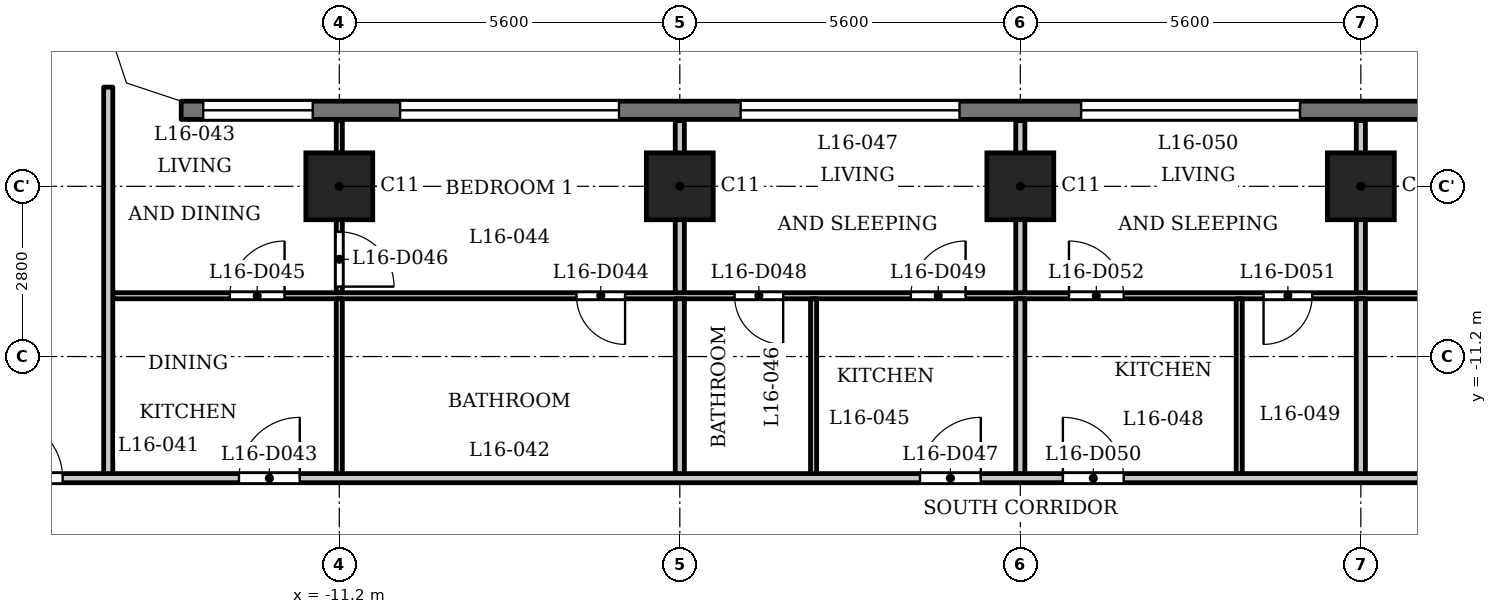
"""IFC4 building model, lengths in metres.
Left out: names, types, materials, properties, quantities, classifications, styles, units other than length and angle.
Written with IfcOpenShell. Run it as: python <this file> out.ifc"""

import sys

from ifc_helpers import new_model, si_unit, direction, frame, frame_2d, origin, origin_2d, place, context, subcontext, project, spatial, polyline, rectangle, outline, extrude, element, fill, save


model = new_model("IFC4")
c1 = context("Model", 3, precision=1e-05, world=origin(), true_north=direction((0.0, 1.0)))
c2 = subcontext(c1, "Body", "Model", "MODEL_VIEW")
j1 = project(units=[si_unit("LENGTHUNIT", "METRE"), si_unit("PLANEANGLEUNIT", "RADIAN")], contexts=[c1])
p1 = place(None, origin())
s1 = spatial("IfcSite", under=j1, at=p1, CompositionType="ELEMENT")
p2 = place(p1, origin())
s2 = spatial("IfcBuilding", under=s1, at=p2, CompositionType="ELEMENT")
p3 = place(p2, frame((0.0, 0.0, 65.5)))
s3 = spatial("IfcBuildingStorey", under=s2, at=p3, CompositionType="ELEMENT", Elevation=65.5)
for number, where, z_axis, x_axis in (
    (1, (-11.2, -8.4, 0.0), (0.0, 0.0, 1.0), (1.0, 0.0, 0.0)),
    (2, (-5.6, -8.4, 0.0), (0.0, 0.0, 1.0), (1.0, 0.0, 0.0)),
    (3, (0.0, -8.4, 0.0), (0.0, 0.0, 1.0), (1.0, 0.0, 0.0)),
    (4, (5.6, -8.4, 0.0), (0.0, 0.0, 1.0), (1.0, 0.0, 0.0)),
):
    element("IfcColumn", number, at=place(p3, frame(where, z_axis=z_axis, x_axis=x_axis)), inside=s3, PredefinedType="COLUMN", context=c2, shape_type="SweptSolid", body=[
        extrude(rectangle(XDim=1.1, YDim=1.1, at=origin_2d()), origin(), (0.0, 0.0, 1.0), 3.5),
    ])
p4 = place(p3, frame((13.8, -7.15, 0.0), z_axis=(0.0, 0.0, 1.0), x_axis=(-1.0, 0.0, 0.0)))
e5 = element("IfcWall", 5, at=p4, inside=s3, PredefinedType="SOLIDWALL", context=c2, shape_type="SweptSolid", body=[
    extrude(rectangle(XDim=27.6, YDim=0.3, at=frame_2d((13.8, 0.0))), origin(), (0.0, 0.0, 1.0), 3.2),
])
p5 = place(p4, frame((0.363, 0.0, 0.9)))
e6 = element("IfcOpeningElement", 6, at=p5, cuts=e5, PredefinedType="OPENING", context=c2, shape_type="SweptSolid", body=[
    extrude(rectangle(XDim=1.8, YDim=1.25, at=frame_2d((0.9, 0.625))), frame((0.0, 0.16, 0.0), z_axis=(0.0, -1.0, 0.0), x_axis=(1.0, 0.0, 0.0)), (0.0, 0.0, 1.0), 0.32),
])
p6 = place(p4, frame((3.6, 0.0, 1.2)))
e7 = element("IfcOpeningElement", 7, at=p6, cuts=e5, PredefinedType="OPENING", context=c2, shape_type="SweptSolid", body=[
    extrude(rectangle(XDim=3.6, YDim=0.95, at=frame_2d((1.8, 0.475))), frame((0.0, 0.16, 0.0), z_axis=(0.0, -1.0, 0.0), x_axis=(1.0, 0.0, 0.0)), (0.0, 0.0, 1.0), 0.32),
])
p7 = place(p4, frame((9.2, 0.0, 1.2)))
e8 = element("IfcOpeningElement", 8, at=p7, cuts=e5, PredefinedType="OPENING", context=c2, shape_type="SweptSolid", body=[
    extrude(rectangle(XDim=3.6, YDim=0.95, at=frame_2d((1.8, 0.475))), frame((0.0, 0.16, 0.0), z_axis=(0.0, -1.0, 0.0), x_axis=(1.0, 0.0, 0.0)), (0.0, 0.0, 1.0), 0.32),
])
p8 = place(p4, frame((14.8, 0.0, 1.2)))
e9 = element("IfcOpeningElement", 9, at=p8, cuts=e5, PredefinedType="OPENING", context=c2, shape_type="SweptSolid", body=[
    extrude(rectangle(XDim=3.6, YDim=0.95, at=frame_2d((1.8, 0.475))), frame((0.0, 0.16, 0.0), z_axis=(0.0, -1.0, 0.0), x_axis=(1.0, 0.0, 0.0)), (0.0, 0.0, 1.0), 0.32),
])
p9 = place(p4, frame((20.4, 0.0, 1.2)))
e10 = element("IfcOpeningElement", 10, at=p9, cuts=e5, PredefinedType="OPENING", context=c2, shape_type="SweptSolid", body=[
    extrude(rectangle(XDim=3.6, YDim=0.95, at=frame_2d((1.8, 0.475))), frame((0.0, 0.16, 0.0), z_axis=(0.0, -1.0, 0.0), x_axis=(1.0, 0.0, 0.0)), (0.0, 0.0, 1.0), 0.32),
])
p10 = place(p4, frame((25.438, 0.0, 0.9)))
e11 = element("IfcOpeningElement", 11, at=p10, cuts=e5, PredefinedType="OPENING", context=c2, shape_type="SweptSolid", body=[
    extrude(rectangle(XDim=1.8, YDim=1.25, at=frame_2d((0.9, 0.625))), frame((0.0, 0.16, 0.0), z_axis=(0.0, -1.0, 0.0), x_axis=(1.0, 0.0, 0.0)), (0.0, 0.0, 1.0), 0.32),
])
p11 = place(p3, frame((-17.4, -13.2, 0.0), z_axis=(0.0, 0.0, 1.0), x_axis=(1.0, 0.0, 0.0)))
e12 = element("IfcWall", 12, at=p11, inside=s3, PredefinedType="PARTITIONING", context=c2, shape_type="SweptSolid", body=[
    extrude(rectangle(XDim=34.8, YDim=0.15, at=frame_2d((17.4, 0.0))), origin(), (0.0, 0.0, 1.0), 3.2),
])
p12 = place(p11, frame((0.65, 0.0, 0.0)))
e13 = element("IfcOpeningElement", 13, at=p12, cuts=e12, PredefinedType="OPENING", context=c2, shape_type="SweptSolid", body=[
    extrude(rectangle(XDim=1.0, YDim=2.1, at=frame_2d((0.5, 1.05))), frame((0.0, 0.085, 0.0), z_axis=(0.0, -1.0, 0.0), x_axis=(1.0, 0.0, 0.0)), (0.0, 0.0, 1.0), 0.17),
])
p13 = place(p11, frame((33.05, 0.0, 0.0)))
e14 = element("IfcOpeningElement", 14, at=p13, cuts=e12, PredefinedType="OPENING", context=c2, shape_type="SweptSolid", body=[
    extrude(rectangle(XDim=1.0, YDim=2.1, at=frame_2d((0.5, 1.05))), frame((0.0, 0.085, 0.0), z_axis=(0.0, -1.0, 0.0), x_axis=(1.0, 0.0, 0.0)), (0.0, 0.0, 1.0), 0.17),
])
p14 = place(p11, frame((4.55, 0.0, 0.0)))
e15 = element("IfcOpeningElement", 15, at=p14, cuts=e12, PredefinedType="OPENING", context=c2, shape_type="SweptSolid", body=[
    extrude(rectangle(XDim=1.0, YDim=2.1, at=frame_2d((0.5, 1.05))), frame((0.0, 0.085, 0.0), z_axis=(0.0, -1.0, 0.0), x_axis=(1.0, 0.0, 0.0)), (0.0, 0.0, 1.0), 0.17),
])
p15 = place(p11, frame((15.75, 0.0, 0.0)))
e16 = element("IfcOpeningElement", 16, at=p15, cuts=e12, PredefinedType="OPENING", context=c2, shape_type="SweptSolid", body=[
    extrude(rectangle(XDim=1.0, YDim=2.1, at=frame_2d((0.5, 1.05))), frame((0.0, 0.085, 0.0), z_axis=(0.0, -1.0, 0.0), x_axis=(1.0, 0.0, 0.0)), (0.0, 0.0, 1.0), 0.17),
])
p16 = place(p11, frame((18.1, 0.0, 0.0)))
e17 = element("IfcOpeningElement", 17, at=p16, cuts=e12, PredefinedType="OPENING", context=c2, shape_type="SweptSolid", body=[
    extrude(rectangle(XDim=1.0, YDim=2.1, at=frame_2d((0.5, 1.05))), frame((0.0, 0.085, 0.0), z_axis=(0.0, -1.0, 0.0), x_axis=(1.0, 0.0, 0.0)), (0.0, 0.0, 1.0), 0.17),
])
p17 = place(p11, frame((26.95, 0.0, 0.0)))
e18 = element("IfcOpeningElement", 18, at=p17, cuts=e12, PredefinedType="OPENING", context=c2, shape_type="SweptSolid", body=[
    extrude(rectangle(XDim=1.0, YDim=2.1, at=frame_2d((0.5, 1.05))), frame((0.0, 0.085, 0.0), z_axis=(0.0, -1.0, 0.0), x_axis=(1.0, 0.0, 0.0)), (0.0, 0.0, 1.0), 0.17),
])
p18 = place(p3, frame((-14.925, -10.2, 0.0), z_axis=(0.0, 0.0, 1.0), x_axis=(1.0, 0.0, 0.0)))
e19 = element("IfcWall", 19, at=p18, inside=s3, PredefinedType="PARTITIONING", context=c2, shape_type="SweptSolid", body=[
    extrude(rectangle(XDim=29.85, YDim=0.1, at=frame_2d((14.925, 0.0))), origin(), (0.0, 0.0, 1.0), 3.2),
])
p19 = place(p18, frame((7.625, 0.0, 0.0)))
e20 = element("IfcOpeningElement", 20, at=p19, cuts=e19, PredefinedType="OPENING", context=c2, shape_type="SweptSolid", body=[
    extrude(rectangle(XDim=0.8, YDim=2.1, at=frame_2d((0.4, 1.05))), frame((0.0, 0.06, 0.0), z_axis=(0.0, -1.0, 0.0), x_axis=(1.0, 0.0, 0.0)), (0.0, 0.0, 1.0), 0.12),
])
p20 = place(p18, frame((1.925, 0.0, 0.0)))
e21 = element("IfcOpeningElement", 21, at=p20, cuts=e19, PredefinedType="OPENING", context=c2, shape_type="SweptSolid", body=[
    extrude(rectangle(XDim=0.9, YDim=2.1, at=frame_2d((0.45, 1.05))), frame((0.0, 0.06, 0.0), z_axis=(0.0, -1.0, 0.0), x_axis=(1.0, 0.0, 0.0)), (0.0, 0.0, 1.0), 0.12),
])
p21 = place(p18, frame((10.225, 0.0, 0.0)))
e22 = element("IfcOpeningElement", 22, at=p21, cuts=e19, PredefinedType="OPENING", context=c2, shape_type="SweptSolid", body=[
    extrude(rectangle(XDim=0.8, YDim=2.1, at=frame_2d((0.4, 1.05))), frame((0.0, 0.06, 0.0), z_axis=(0.0, -1.0, 0.0), x_axis=(1.0, 0.0, 0.0)), (0.0, 0.0, 1.0), 0.12),
])
p22 = place(p18, frame((13.125, 0.0, 0.0)))
e23 = element("IfcOpeningElement", 23, at=p22, cuts=e19, PredefinedType="OPENING", context=c2, shape_type="SweptSolid", body=[
    extrude(rectangle(XDim=0.9, YDim=2.1, at=frame_2d((0.45, 1.05))), frame((0.0, 0.06, 0.0), z_axis=(0.0, -1.0, 0.0), x_axis=(1.0, 0.0, 0.0)), (0.0, 0.0, 1.0), 0.12),
])
p23 = place(p18, frame((18.925, 0.0, 0.0)))
e24 = element("IfcOpeningElement", 24, at=p23, cuts=e19, PredefinedType="OPENING", context=c2, shape_type="SweptSolid", body=[
    extrude(rectangle(XDim=0.8, YDim=2.1, at=frame_2d((0.4, 1.05))), frame((0.0, 0.06, 0.0), z_axis=(0.0, -1.0, 0.0), x_axis=(1.0, 0.0, 0.0)), (0.0, 0.0, 1.0), 0.12),
])
p24 = place(p18, frame((15.725, 0.0, 0.0)))
e25 = element("IfcOpeningElement", 25, at=p24, cuts=e19, PredefinedType="OPENING", context=c2, shape_type="SweptSolid", body=[
    extrude(rectangle(XDim=0.9, YDim=2.1, at=frame_2d((0.45, 1.05))), frame((0.0, 0.06, 0.0), z_axis=(0.0, -1.0, 0.0), x_axis=(1.0, 0.0, 0.0)), (0.0, 0.0, 1.0), 0.12),
])
p25 = place(p18, frame((28.525, 0.0, 0.0)))
e26 = element("IfcOpeningElement", 26, at=p25, cuts=e19, PredefinedType="OPENING", context=c2, shape_type="SweptSolid", body=[
    extrude(rectangle(XDim=0.8, YDim=2.1, at=frame_2d((0.4, 1.05))), frame((0.0, 0.06, 0.0), z_axis=(0.0, -1.0, 0.0), x_axis=(1.0, 0.0, 0.0)), (0.0, 0.0, 1.0), 0.12),
])
p26 = place(p18, frame((24.325, 0.0, 0.0)))
e27 = element("IfcOpeningElement", 27, at=p26, cuts=e19, PredefinedType="OPENING", context=c2, shape_type="SweptSolid", body=[
    extrude(rectangle(XDim=0.9, YDim=2.1, at=frame_2d((0.45, 1.05))), frame((0.0, 0.06, 0.0), z_axis=(0.0, -1.0, 0.0), x_axis=(1.0, 0.0, 0.0)), (0.0, 0.0, 1.0), 0.12),
])
p27 = place(p3, frame((-15.0, -13.125, 0.0), z_axis=(0.0, 0.0, 1.0), x_axis=(0.0, 1.0, 0.0)))
e28 = element("IfcWall", 28, at=p27, inside=s3, PredefinedType="PARTITIONING", context=c2, shape_type="SweptSolid", body=[
    extrude(rectangle(XDim=6.356, YDim=0.15, at=frame_2d((3.178, 0.0))), origin(), (0.0, 0.0, 1.0), 3.2),
])
p28 = place(p3, frame((-11.2, -13.125, 0.0), z_axis=(0.0, 0.0, 1.0), x_axis=(0.0, 1.0, 0.0)))
e29 = element("IfcWall", 29, at=p28, inside=s3, PredefinedType="PARTITIONING", context=c2, shape_type="SweptSolid", body=[
    extrude(rectangle(XDim=2.875, YDim=0.1, at=frame_2d((1.438, 0.0))), origin(), (0.0, 0.0, 1.0), 3.2),
])
p29 = place(p3, frame((-11.2, -10.15, 0.0), z_axis=(0.0, 0.0, 1.0), x_axis=(0.0, 1.0, 0.0)))
e30 = element("IfcWall", 30, at=p29, inside=s3, PredefinedType="PARTITIONING", context=c2, shape_type="SweptSolid", body=[
    extrude(rectangle(XDim=2.83, YDim=0.1, at=frame_2d((1.415, 0.0))), origin(), (0.0, 0.0, 1.0), 3.2),
])
p30 = place(p29, frame((0.1, 0.0, 0.0)))
e31 = element("IfcOpeningElement", 31, at=p30, cuts=e30, PredefinedType="OPENING", context=c2, shape_type="SweptSolid", body=[
    extrude(rectangle(XDim=0.9, YDim=2.1, at=frame_2d((0.45, 1.05))), frame((0.0, 0.06, 0.0), z_axis=(0.0, -1.0, 0.0), x_axis=(1.0, 0.0, 0.0)), (0.0, 0.0, 1.0), 0.12),
])
p31 = place(p3, frame((-5.6, -13.125, 0.0), z_axis=(0.0, 0.0, 1.0), x_axis=(0.0, 1.0, 0.0)))
e32 = element("IfcWall", 32, at=p31, inside=s3, PredefinedType="PARTITIONING", context=c2, shape_type="SweptSolid", body=[
    extrude(rectangle(XDim=2.875, YDim=0.15, at=frame_2d((1.438, 0.0))), origin(), (0.0, 0.0, 1.0), 3.2),
])
p32 = place(p3, frame((-5.6, -10.15, 0.0), z_axis=(0.0, 0.0, 1.0), x_axis=(0.0, 1.0, 0.0)))
e33 = element("IfcWall", 33, at=p32, inside=s3, PredefinedType="PARTITIONING", context=c2, shape_type="SweptSolid", body=[
    extrude(rectangle(XDim=2.83, YDim=0.15, at=frame_2d((1.415, 0.0))), origin(), (0.0, 0.0, 1.0), 3.2),
])
p33 = place(p3, frame((-3.4, -13.125, 0.0), z_axis=(0.0, 0.0, 1.0), x_axis=(0.0, 1.0, 0.0)))
e34 = element("IfcWall", 34, at=p33, inside=s3, PredefinedType="PARTITIONING", context=c2, shape_type="SweptSolid", body=[
    extrude(rectangle(XDim=2.875, YDim=0.1, at=frame_2d((1.438, 0.0))), origin(), (0.0, 0.0, 1.0), 3.2),
])
p34 = place(p3, frame((0.0, -13.125, 0.0), z_axis=(0.0, 0.0, 1.0), x_axis=(0.0, 1.0, 0.0)))
e35 = element("IfcWall", 35, at=p34, inside=s3, PredefinedType="PARTITIONING", context=c2, shape_type="SweptSolid", body=[
    extrude(rectangle(XDim=2.875, YDim=0.15, at=frame_2d((1.438, 0.0))), origin(), (0.0, 0.0, 1.0), 3.2),
])
p35 = place(p3, frame((0.0, -10.15, 0.0), z_axis=(0.0, 0.0, 1.0), x_axis=(0.0, 1.0, 0.0)))
e36 = element("IfcWall", 36, at=p35, inside=s3, PredefinedType="PARTITIONING", context=c2, shape_type="SweptSolid", body=[
    extrude(rectangle(XDim=2.83, YDim=0.15, at=frame_2d((1.415, 0.0))), origin(), (0.0, 0.0, 1.0), 3.2),
])
p36 = place(p3, frame((3.6, -13.125, 0.0), z_axis=(0.0, 0.0, 1.0), x_axis=(0.0, 1.0, 0.0)))
e37 = element("IfcWall", 37, at=p36, inside=s3, PredefinedType="PARTITIONING", context=c2, shape_type="SweptSolid", body=[
    extrude(rectangle(XDim=2.875, YDim=0.1, at=frame_2d((1.438, 0.0))), origin(), (0.0, 0.0, 1.0), 3.2),
])
p37 = place(p3, frame((5.6, -13.125, 0.0), z_axis=(0.0, 0.0, 1.0), x_axis=(0.0, 1.0, 0.0)))
e38 = element("IfcWall", 38, at=p37, inside=s3, PredefinedType="PARTITIONING", context=c2, shape_type="SweptSolid", body=[
    extrude(rectangle(XDim=2.875, YDim=0.15, at=frame_2d((1.438, 0.0))), origin(), (0.0, 0.0, 1.0), 3.2),
])
p38 = place(p3, frame((5.6, -10.15, 0.0), z_axis=(0.0, 0.0, 1.0), x_axis=(0.0, 1.0, 0.0)))
e39 = element("IfcWall", 39, at=p38, inside=s3, PredefinedType="PARTITIONING", context=c2, shape_type="SweptSolid", body=[
    extrude(rectangle(XDim=2.83, YDim=0.15, at=frame_2d((1.415, 0.0))), origin(), (0.0, 0.0, 1.0), 3.2),
])
p39 = place(p3, origin())
e40 = element("IfcWall", 40, at=p39, inside=s3, PredefinedType="SOLIDWALL", context=c2, shape_type="SweptSolid", body=[
    extrude(outline(polyline([(-14.937, -6.937), (-13.849, -7.3), (-13.8, -7.3), (-13.8, -7.0), (-14.7, -6.7), (-15.0, -5.8), (-15.3, -5.8), (-15.3, -5.849), (-14.937, -6.937)])), origin(), (0.0, 0.0, 1.0), 3.2),
])
p40 = place(p12, origin())
e41 = element("IfcDoor", 41, at=p40, inside=s3, OperationType="SINGLE_SWING_RIGHT", PredefinedType="DOOR", context=c2, shape_type="SweptSolid", body=[
    extrude(rectangle(XDim=1.0, YDim=2.1, at=frame_2d((0.5, 1.05))), frame((0.0, 0.025, 0.0), z_axis=(0.0, -1.0, 0.0), x_axis=(1.0, 0.0, 0.0)), (0.0, 0.0, 1.0), 0.05),
])
fill(e13, e41)
p41 = place(p14, origin())
e42 = element("IfcDoor", 42, at=p41, inside=s3, OperationType="SINGLE_SWING_LEFT", PredefinedType="DOOR", context=c2, shape_type="SweptSolid", body=[
    extrude(rectangle(XDim=1.0, YDim=2.1, at=frame_2d((0.5, 1.05))), frame((0.0, 0.025, 0.0), z_axis=(0.0, -1.0, 0.0), x_axis=(1.0, 0.0, 0.0)), (0.0, 0.0, 1.0), 0.05),
])
fill(e15, e42)
p42 = place(p19, origin())
e43 = element("IfcDoor", 43, at=p42, inside=s3, OperationType="SINGLE_SWING_RIGHT", PredefinedType="DOOR", context=c2, shape_type="SweptSolid", body=[
    extrude(rectangle(XDim=0.8, YDim=2.1, at=frame_2d((0.4, 1.05))), frame((0.0, 0.025, 0.0), z_axis=(0.0, -1.0, 0.0), x_axis=(1.0, 0.0, 0.0)), (0.0, 0.0, 1.0), 0.05),
])
fill(e20, e43)
p43 = place(p20, origin())
e44 = element("IfcDoor", 44, at=p43, inside=s3, OperationType="SINGLE_SWING_LEFT", PredefinedType="DOOR", context=c2, shape_type="SweptSolid", body=[
    extrude(rectangle(XDim=0.9, YDim=2.1, at=frame_2d((0.45, 1.05))), frame((0.0, 0.025, 0.0), z_axis=(0.0, -1.0, 0.0), x_axis=(1.0, 0.0, 0.0)), (0.0, 0.0, 1.0), 0.05),
])
fill(e21, e44)
p44 = place(p30, origin())
e45 = element("IfcDoor", 45, at=p44, inside=s3, OperationType="SINGLE_SWING_LEFT", PredefinedType="DOOR", context=c2, shape_type="SweptSolid", body=[
    extrude(rectangle(XDim=0.9, YDim=2.1, at=frame_2d((0.45, 1.05))), frame((0.0, 0.025, 0.0), z_axis=(0.0, -1.0, 0.0), x_axis=(1.0, 0.0, 0.0)), (0.0, 0.0, 1.0), 0.05),
])
fill(e31, e45)
p45 = place(p15, origin())
e46 = element("IfcDoor", 46, at=p45, inside=s3, OperationType="SINGLE_SWING_LEFT", PredefinedType="DOOR", context=c2, shape_type="SweptSolid", body=[
    extrude(rectangle(XDim=1.0, YDim=2.1, at=frame_2d((0.5, 1.05))), frame((0.0, 0.025, 0.0), z_axis=(0.0, -1.0, 0.0), x_axis=(1.0, 0.0, 0.0)), (0.0, 0.0, 1.0), 0.05),
])
fill(e16, e46)
p46 = place(p21, origin())
e47 = element("IfcDoor", 47, at=p46, inside=s3, OperationType="SINGLE_SWING_RIGHT", PredefinedType="DOOR", context=c2, shape_type="SweptSolid", body=[
    extrude(rectangle(XDim=0.8, YDim=2.1, at=frame_2d((0.4, 1.05))), frame((0.0, 0.025, 0.0), z_axis=(0.0, -1.0, 0.0), x_axis=(1.0, 0.0, 0.0)), (0.0, 0.0, 1.0), 0.05),
])
fill(e22, e47)
p47 = place(p22, origin())
e48 = element("IfcDoor", 48, at=p47, inside=s3, OperationType="SINGLE_SWING_LEFT", PredefinedType="DOOR", context=c2, shape_type="SweptSolid", body=[
    extrude(rectangle(XDim=0.9, YDim=2.1, at=frame_2d((0.45, 1.05))), frame((0.0, 0.025, 0.0), z_axis=(0.0, -1.0, 0.0), x_axis=(1.0, 0.0, 0.0)), (0.0, 0.0, 1.0), 0.05),
])
fill(e23, e48)
p48 = place(p16, origin())
e49 = element("IfcDoor", 49, at=p48, inside=s3, OperationType="SINGLE_SWING_RIGHT", PredefinedType="DOOR", context=c2, shape_type="SweptSolid", body=[
    extrude(rectangle(XDim=1.0, YDim=2.1, at=frame_2d((0.5, 1.05))), frame((0.0, 0.025, 0.0), z_axis=(0.0, -1.0, 0.0), x_axis=(1.0, 0.0, 0.0)), (0.0, 0.0, 1.0), 0.05),
])
fill(e17, e49)
p49 = place(p23, origin())
e50 = element("IfcDoor", 50, at=p49, inside=s3, OperationType="SINGLE_SWING_LEFT", PredefinedType="DOOR", context=c2, shape_type="SweptSolid", body=[
    extrude(rectangle(XDim=0.8, YDim=2.1, at=frame_2d((0.4, 1.05))), frame((0.0, 0.025, 0.0), z_axis=(0.0, -1.0, 0.0), x_axis=(1.0, 0.0, 0.0)), (0.0, 0.0, 1.0), 0.05),
])
fill(e24, e50)
p50 = place(p24, origin())
e51 = element("IfcDoor", 51, at=p50, inside=s3, OperationType="SINGLE_SWING_RIGHT", PredefinedType="DOOR", context=c2, shape_type="SweptSolid", body=[
    extrude(rectangle(XDim=0.9, YDim=2.1, at=frame_2d((0.45, 1.05))), frame((0.0, 0.025, 0.0), z_axis=(0.0, -1.0, 0.0), x_axis=(1.0, 0.0, 0.0)), (0.0, 0.0, 1.0), 0.05),
])
fill(e25, e51)
p51 = place(p7, origin())
e52 = element("IfcWindow", 52, at=p51, inside=s3, PartitioningType="SINGLE_PANEL", PredefinedType="WINDOW", context=c2, shape_type="SweptSolid", body=[
    extrude(rectangle(XDim=3.6, YDim=0.95, at=frame_2d((1.8, 0.475))), frame((0.0, 0.03, 0.0), z_axis=(0.0, -1.0, 0.0), x_axis=(1.0, 0.0, 0.0)), (0.0, 0.0, 1.0), 0.06),
])
fill(e8, e52)
p52 = place(p8, origin())
e53 = element("IfcWindow", 53, at=p52, inside=s3, PartitioningType="SINGLE_PANEL", PredefinedType="WINDOW", context=c2, shape_type="SweptSolid", body=[
    extrude(rectangle(XDim=3.6, YDim=0.95, at=frame_2d((1.8, 0.475))), frame((0.0, 0.03, 0.0), z_axis=(0.0, -1.0, 0.0), x_axis=(1.0, 0.0, 0.0)), (0.0, 0.0, 1.0), 0.06),
])
fill(e9, e53)
p53 = place(p9, origin())
e54 = element("IfcWindow", 54, at=p53, inside=s3, PartitioningType="SINGLE_PANEL", PredefinedType="WINDOW", context=c2, shape_type="SweptSolid", body=[
    extrude(rectangle(XDim=3.6, YDim=0.95, at=frame_2d((1.8, 0.475))), frame((0.0, 0.03, 0.0), z_axis=(0.0, -1.0, 0.0), x_axis=(1.0, 0.0, 0.0)), (0.0, 0.0, 1.0), 0.06),
])
fill(e10, e54)
p54 = place(p10, origin())
e55 = element("IfcWindow", 55, at=p54, inside=s3, PartitioningType="SINGLE_PANEL", PredefinedType="WINDOW", context=c2, shape_type="SweptSolid", body=[
    extrude(rectangle(XDim=1.8, YDim=1.25, at=frame_2d((0.9, 0.625))), frame((0.0, 0.03, 0.0), z_axis=(0.0, -1.0, 0.0), x_axis=(1.0, 0.0, 0.0)), (0.0, 0.0, 1.0), 0.06),
])
fill(e11, e55)
save(model, sys.argv[1])
